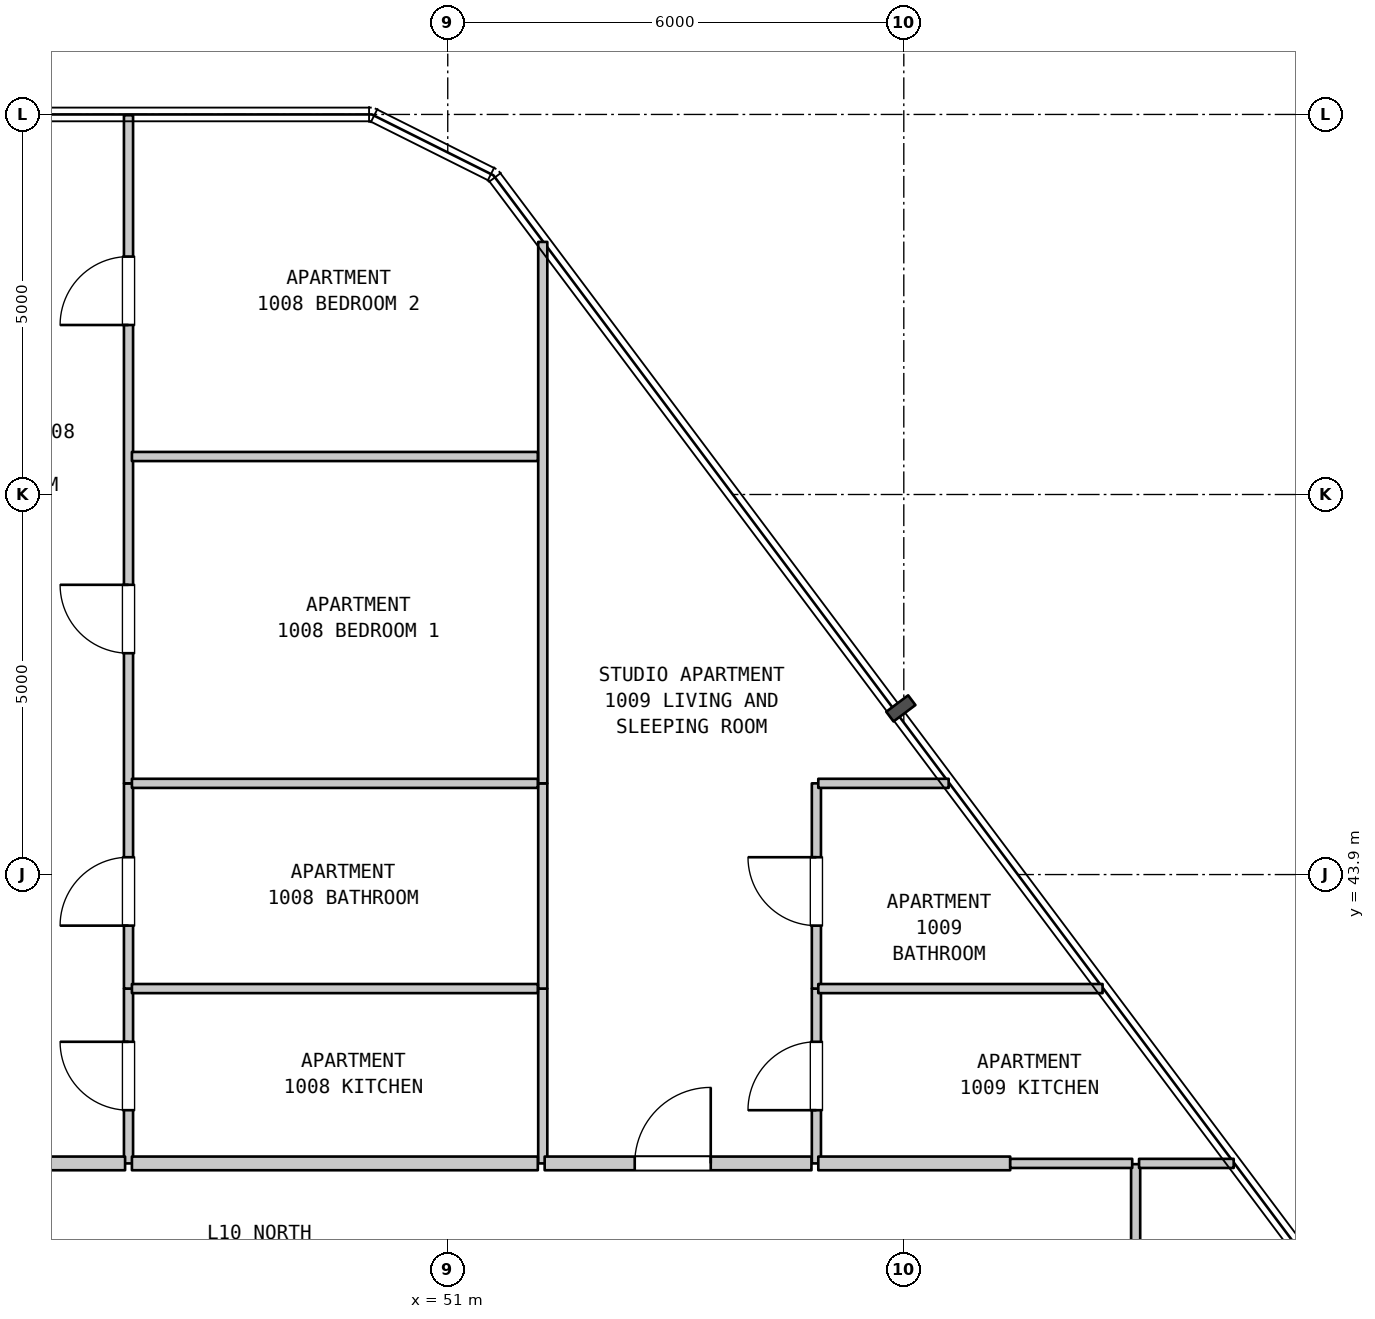
"""IFC4 building model, lengths in metres.
Left out: names, types, materials, properties, quantities, classifications, styles, units other than length and angle.
Written with IfcOpenShell. Run it as: python <this file> out.ifc"""

import sys

from ifc_helpers import new_model, si_unit, direction, frame, frame_2d, origin, place, context, subcontext, project, spatial, rectangle, extrude, element, fill, save


model = new_model("IFC4")
c1 = context("Model", 3, precision=1e-05, world=origin(), true_north=direction((0.0, 1.0)))
c2 = subcontext(c1, "Body", "Model", "MODEL_VIEW")
j1 = project(units=[si_unit("LENGTHUNIT", "METRE"), si_unit("PLANEANGLEUNIT", "RADIAN")], contexts=[c1])
p1 = place(None, origin())
s1 = spatial("IfcSite", under=j1, at=p1, CompositionType="ELEMENT")
p2 = place(p1, origin())
s2 = spatial("IfcBuilding", under=s1, at=p2, CompositionType="ELEMENT")
p3 = place(p2, frame((0.0, 0.0, 46.2)))
s3 = spatial("IfcBuildingStorey", under=s2, at=p3, CompositionType="ELEMENT", Elevation=46.2)
p4 = place(p3, frame((46.8, 40.1, 0.0), z_axis=(0.0, 0.0, 1.0), x_axis=(0.0, 1.0, 0.0)))
e1 = element("IfcWall", 1, at=p4, inside=s3, PredefinedType="PARTITIONING", context=c2, shape_type="SweptSolid", body=[
    extrude(rectangle(XDim=2.3, YDim=0.12, at=frame_2d((1.15, 0.0))), origin(), (0.0, 0.0, 1.0), 3.385),
])
p5 = place(p4, frame((0.7, 0.0, 0.0)))
e2 = element("IfcOpeningElement", 2, at=p5, cuts=e1, PredefinedType="OPENING", context=c2, shape_type="SweptSolid", body=[
    extrude(rectangle(XDim=0.9, YDim=2.15, at=frame_2d((0.45, 1.075))), frame((0.0, 0.07, 0.0), z_axis=(0.0, -1.0, 0.0), x_axis=(1.0, 0.0, 0.0)), (0.0, 0.0, 1.0), 0.14),
])
p6 = place(p3, frame((46.8, 42.4, 0.0), z_axis=(0.0, 0.0, 1.0), x_axis=(0.0, 1.0, 0.0)))
e3 = element("IfcWall", 3, at=p6, inside=s3, PredefinedType="PARTITIONING", context=c2, shape_type="SweptSolid", body=[
    extrude(rectangle(XDim=2.7, YDim=0.12, at=frame_2d((1.35, 0.0))), origin(), (0.0, 0.0, 1.0), 3.385),
])
p7 = place(p6, frame((0.828, 0.0, 0.0)))
e4 = element("IfcOpeningElement", 4, at=p7, cuts=e3, PredefinedType="OPENING", context=c2, shape_type="SweptSolid", body=[
    extrude(rectangle(XDim=0.9, YDim=2.1, at=frame_2d((0.45, 1.05))), frame((0.0, 0.07, 0.0), z_axis=(0.0, -1.0, 0.0), x_axis=(1.0, 0.0, 0.0)), (0.0, 0.0, 1.0), 0.14),
])
p8 = place(p3, frame((46.8, 45.1, 0.0), z_axis=(0.0, 0.0, 1.0), x_axis=(0.0, 1.0, 0.0)))
e5 = element("IfcWall", 5, at=p8, inside=s3, PredefinedType="PARTITIONING", context=c2, shape_type="SweptSolid", body=[
    extrude(rectangle(XDim=8.79, YDim=0.12, at=frame_2d((4.395, 0.0))), origin(), (0.0, 0.0, 1.0), 3.385),
])
p9 = place(p8, frame((1.712, 0.0, 0.0)))
e6 = element("IfcOpeningElement", 6, at=p9, cuts=e5, PredefinedType="OPENING", context=c2, shape_type="SweptSolid", body=[
    extrude(rectangle(XDim=0.9, YDim=2.15, at=frame_2d((0.45, 1.075))), frame((0.0, 0.07, 0.0), z_axis=(0.0, -1.0, 0.0), x_axis=(1.0, 0.0, 0.0)), (0.0, 0.0, 1.0), 0.14),
])
p10 = place(p8, frame((6.03, 0.0, 0.0)))
e7 = element("IfcOpeningElement", 7, at=p10, cuts=e5, PredefinedType="OPENING", context=c2, shape_type="SweptSolid", body=[
    extrude(rectangle(XDim=0.9, YDim=2.15, at=frame_2d((0.45, 1.075))), frame((0.0, 0.07, 0.0), z_axis=(0.0, -1.0, 0.0), x_axis=(1.0, 0.0, 0.0)), (0.0, 0.0, 1.0), 0.14),
])
p11 = place(p3, frame((52.25, 40.1, 0.0), z_axis=(0.0, 0.0, 1.0), x_axis=(0.0, 1.0, 0.0)))
e8 = element("IfcWall", 8, at=p11, inside=s3, PredefinedType="PARTITIONING", context=c2, shape_type="SweptSolid", body=[
    extrude(rectangle(XDim=2.3, YDim=0.12, at=frame_2d((1.15, 0.0))), origin(), (0.0, 0.0, 1.0), 3.385),
])
p12 = place(p3, frame((52.25, 42.4, 0.0), z_axis=(0.0, 0.0, 1.0), x_axis=(0.0, 1.0, 0.0)))
e9 = element("IfcWall", 9, at=p12, inside=s3, PredefinedType="PARTITIONING", context=c2, shape_type="SweptSolid", body=[
    extrude(rectangle(XDim=2.7, YDim=0.12, at=frame_2d((1.35, 0.0))), origin(), (0.0, 0.0, 1.0), 3.385),
])
p13 = place(p3, frame((52.25, 45.1, 0.0), z_axis=(0.0, 0.0, 1.0), x_axis=(0.0, 1.0, 0.0)))
e10 = element("IfcWall", 10, at=p13, inside=s3, PredefinedType="PARTITIONING", context=c2, shape_type="SweptSolid", body=[
    extrude(rectangle(XDim=7.123, YDim=0.12, at=frame_2d((3.562, 0.0))), origin(), (0.0, 0.0, 1.0), 3.385),
])
p14 = place(p3, frame((55.85, 40.1, 0.0), z_axis=(0.0, 0.0, 1.0), x_axis=(0.0, 1.0, 0.0)))
e11 = element("IfcWall", 11, at=p14, inside=s3, PredefinedType="PARTITIONING", context=c2, shape_type="SweptSolid", body=[
    extrude(rectangle(XDim=2.3, YDim=0.12, at=frame_2d((1.15, 0.0))), origin(), (0.0, 0.0, 1.0), 3.385),
])
p15 = place(p14, frame((0.7, 0.0, 0.0)))
e12 = element("IfcOpeningElement", 12, at=p15, cuts=e11, PredefinedType="OPENING", context=c2, shape_type="SweptSolid", body=[
    extrude(rectangle(XDim=0.9, YDim=2.15, at=frame_2d((0.45, 1.075))), frame((0.0, 0.07, 0.0), z_axis=(0.0, -1.0, 0.0), x_axis=(1.0, 0.0, 0.0)), (0.0, 0.0, 1.0), 0.14),
])
p16 = place(p3, frame((55.85, 42.4, 0.0), z_axis=(0.0, 0.0, 1.0), x_axis=(0.0, 1.0, 0.0)))
e13 = element("IfcWall", 13, at=p16, inside=s3, PredefinedType="PARTITIONING", context=c2, shape_type="SweptSolid", body=[
    extrude(rectangle(XDim=2.7, YDim=0.12, at=frame_2d((1.35, 0.0))), origin(), (0.0, 0.0, 1.0), 3.385),
])
p17 = place(p16, frame((0.828, 0.0, 0.0)))
e14 = element("IfcOpeningElement", 14, at=p17, cuts=e13, PredefinedType="OPENING", context=c2, shape_type="SweptSolid", body=[
    extrude(rectangle(XDim=0.9, YDim=2.1, at=frame_2d((0.45, 1.05))), frame((0.0, 0.07, 0.0), z_axis=(0.0, -1.0, 0.0), x_axis=(1.0, 0.0, 0.0)), (0.0, 0.0, 1.0), 0.14),
])
p18 = place(p3, frame((60.05, 37.89, 0.0), z_axis=(0.0, 0.0, 1.0), x_axis=(0.0, 1.0, 0.0)))
e15 = element("IfcWall", 15, at=p18, inside=s3, PredefinedType="PARTITIONING", context=c2, shape_type="SweptSolid", body=[
    extrude(rectangle(XDim=2.2, YDim=0.12, at=frame_2d((1.1, 0.0))), origin(), (0.0, 0.0, 1.0), 3.385),
])
p19 = place(p3, frame((42.795, 40.1, 0.0), z_axis=(0.0, 0.0, 1.0), x_axis=(1.0, 0.0, 0.0)))
e16 = element("IfcWall", 16, at=p19, inside=s3, PredefinedType="STANDARD", context=c2, shape_type="SweptSolid", body=[
    extrude(rectangle(XDim=3.96, YDim=0.18, at=frame_2d((1.98, 0.0))), origin(), (0.0, 0.0, 1.0), 3.385),
])
p20 = place(p19, frame((1.609, 0.0, 0.0)))
e17 = element("IfcOpeningElement", 17, at=p20, cuts=e16, PredefinedType="OPENING", context=c2, shape_type="SweptSolid", body=[
    extrude(rectangle(XDim=1.0, YDim=2.15, at=frame_2d((0.5, 1.075))), frame((0.0, 0.1, 0.0), z_axis=(0.0, -1.0, 0.0), x_axis=(1.0, 0.0, 0.0)), (0.0, 0.0, 1.0), 0.2),
])
p21 = place(p3, frame((46.845, 40.1, 0.0), z_axis=(0.0, 0.0, 1.0), x_axis=(1.0, 0.0, 0.0)))
e18 = element("IfcWall", 18, at=p21, inside=s3, PredefinedType="STANDARD", context=c2, shape_type="SweptSolid", body=[
    extrude(rectangle(XDim=5.34, YDim=0.18, at=frame_2d((2.67, 0.0))), origin(), (0.0, 0.0, 1.0), 3.385),
])
p22 = place(p3, frame((52.275, 40.1, 0.0), z_axis=(0.0, 0.0, 1.0), x_axis=(1.0, 0.0, 0.0)))
e19 = element("IfcWall", 19, at=p22, inside=s3, PredefinedType="STANDARD", context=c2, shape_type="SweptSolid", body=[
    extrude(rectangle(XDim=3.51, YDim=0.18, at=frame_2d((1.755, 0.0))), origin(), (0.0, 0.0, 1.0), 3.385),
])
p23 = place(p22, frame((1.185, 0.0, 0.0)))
e20 = element("IfcOpeningElement", 20, at=p23, cuts=e19, PredefinedType="OPENING", context=c2, shape_type="SweptSolid", body=[
    extrude(rectangle(XDim=1.0, YDim=2.15, at=frame_2d((0.5, 1.075))), frame((0.0, 0.1, 0.0), z_axis=(0.0, -1.0, 0.0), x_axis=(1.0, 0.0, 0.0)), (0.0, 0.0, 1.0), 0.2),
])
p24 = place(p3, frame((55.875, 40.1, 0.0), z_axis=(0.0, 0.0, 1.0), x_axis=(1.0, 0.0, 0.0)))
e21 = element("IfcWall", 21, at=p24, inside=s3, PredefinedType="STANDARD", context=c2, shape_type="SweptSolid", body=[
    extrude(rectangle(XDim=2.525, YDim=0.18, at=frame_2d((1.262, 0.0))), origin(), (0.0, 0.0, 1.0), 3.385),
])
p25 = place(p3, frame((58.4, 40.1, 0.0), z_axis=(0.0, 0.0, 1.0), x_axis=(1.0, 0.0, 0.0)))
e22 = element("IfcWall", 22, at=p25, inside=s3, PredefinedType="PARTITIONING", context=c2, shape_type="SweptSolid", body=[
    extrude(rectangle(XDim=1.605, YDim=0.12, at=frame_2d((0.802, 0.0))), origin(), (0.0, 0.0, 1.0), 3.385),
])
p26 = place(p3, frame((60.095, 40.1, 0.0), z_axis=(0.0, 0.0, 1.0), x_axis=(1.0, 0.0, 0.0)))
e23 = element("IfcWall", 23, at=p26, inside=s3, PredefinedType="PARTITIONING", context=c2, shape_type="SweptSolid", body=[
    extrude(rectangle(XDim=1.245, YDim=0.12, at=frame_2d((0.623, 0.0))), origin(), (0.0, 0.0, 1.0), 3.385),
])
p27 = place(p3, frame((46.845, 42.4, 0.0), z_axis=(0.0, 0.0, 1.0), x_axis=(1.0, 0.0, 0.0)))
e24 = element("IfcWall", 24, at=p27, inside=s3, PredefinedType="PARTITIONING", context=c2, shape_type="SweptSolid", body=[
    extrude(rectangle(XDim=5.34, YDim=0.12, at=frame_2d((2.67, 0.0))), origin(), (0.0, 0.0, 1.0), 3.385),
])
p28 = place(p3, frame((55.875, 42.4, 0.0), z_axis=(0.0, 0.0, 1.0), x_axis=(1.0, 0.0, 0.0)))
e25 = element("IfcWall", 25, at=p28, inside=s3, PredefinedType="PARTITIONING", context=c2, shape_type="SweptSolid", body=[
    extrude(rectangle(XDim=3.74, YDim=0.12, at=frame_2d((1.87, 0.0))), origin(), (0.0, 0.0, 1.0), 3.385),
])
p29 = place(p3, frame((46.845, 45.1, 0.0), z_axis=(0.0, 0.0, 1.0), x_axis=(1.0, 0.0, 0.0)))
e26 = element("IfcWall", 26, at=p29, inside=s3, PredefinedType="PARTITIONING", context=c2, shape_type="SweptSolid", body=[
    extrude(rectangle(XDim=5.34, YDim=0.12, at=frame_2d((2.67, 0.0))), origin(), (0.0, 0.0, 1.0), 3.385),
])
p30 = place(p3, frame((55.875, 45.1, 0.0), z_axis=(0.0, 0.0, 1.0), x_axis=(1.0, 0.0, 0.0)))
e27 = element("IfcWall", 27, at=p30, inside=s3, PredefinedType="PARTITIONING", context=c2, shape_type="SweptSolid", body=[
    extrude(rectangle(XDim=1.715, YDim=0.12, at=frame_2d((0.857, 0.0))), origin(), (0.0, 0.0, 1.0), 3.385),
])
p31 = place(p3, frame((46.845, 49.4, 0.0), z_axis=(0.0, 0.0, 1.0), x_axis=(1.0, 0.0, 0.0)))
e28 = element("IfcWall", 28, at=p31, inside=s3, PredefinedType="PARTITIONING", context=c2, shape_type="SweptSolid", body=[
    extrude(rectangle(XDim=5.34, YDim=0.12, at=frame_2d((2.67, 0.0))), origin(), (0.0, 0.0, 1.0), 3.385),
])
p32 = place(p5, origin())
e29 = element("IfcDoor", 29, at=p32, inside=s3, OperationType="SINGLE_SWING_RIGHT", PredefinedType="DOOR", context=c2, shape_type="SweptSolid", body=[
    extrude(rectangle(XDim=0.9, YDim=2.15, at=frame_2d((0.45, 1.075))), frame((0.0, 0.025, 0.0), z_axis=(0.0, -1.0, 0.0), x_axis=(1.0, 0.0, 0.0)), (0.0, 0.0, 1.0), 0.05),
])
fill(e2, e29)
p33 = place(p7, origin())
e30 = element("IfcDoor", 30, at=p33, inside=s3, OperationType="SINGLE_SWING_LEFT", PredefinedType="DOOR", context=c2, shape_type="SweptSolid", body=[
    extrude(rectangle(XDim=0.9, YDim=2.1, at=frame_2d((0.45, 1.05))), frame((0.0, 0.025, 0.0), z_axis=(0.0, -1.0, 0.0), x_axis=(1.0, 0.0, 0.0)), (0.0, 0.0, 1.0), 0.05),
])
fill(e4, e30)
p34 = place(p9, origin())
e31 = element("IfcDoor", 31, at=p34, inside=s3, OperationType="SINGLE_SWING_RIGHT", PredefinedType="DOOR", context=c2, shape_type="SweptSolid", body=[
    extrude(rectangle(XDim=0.9, YDim=2.15, at=frame_2d((0.45, 1.075))), frame((0.0, 0.025, 0.0), z_axis=(0.0, -1.0, 0.0), x_axis=(1.0, 0.0, 0.0)), (0.0, 0.0, 1.0), 0.05),
])
fill(e6, e31)
p35 = place(p10, origin())
e32 = element("IfcDoor", 32, at=p35, inside=s3, OperationType="SINGLE_SWING_LEFT", PredefinedType="DOOR", context=c2, shape_type="SweptSolid", body=[
    extrude(rectangle(XDim=0.9, YDim=2.15, at=frame_2d((0.45, 1.075))), frame((0.0, 0.025, 0.0), z_axis=(0.0, -1.0, 0.0), x_axis=(1.0, 0.0, 0.0)), (0.0, 0.0, 1.0), 0.05),
])
fill(e7, e32)
p36 = place(p15, origin())
e33 = element("IfcDoor", 33, at=p36, inside=s3, OperationType="SINGLE_SWING_LEFT", PredefinedType="DOOR", context=c2, shape_type="SweptSolid", body=[
    extrude(rectangle(XDim=0.9, YDim=2.15, at=frame_2d((0.45, 1.075))), frame((0.0, 0.025, 0.0), z_axis=(0.0, -1.0, 0.0), x_axis=(1.0, 0.0, 0.0)), (0.0, 0.0, 1.0), 0.05),
])
fill(e12, e33)
p37 = place(p17, origin())
e34 = element("IfcDoor", 34, at=p37, inside=s3, OperationType="SINGLE_SWING_RIGHT", PredefinedType="DOOR", context=c2, shape_type="SweptSolid", body=[
    extrude(rectangle(XDim=0.9, YDim=2.1, at=frame_2d((0.45, 1.05))), frame((0.0, 0.025, 0.0), z_axis=(0.0, -1.0, 0.0), x_axis=(1.0, 0.0, 0.0)), (0.0, 0.0, 1.0), 0.05),
])
fill(e14, e34)
p38 = place(p23, origin())
e35 = element("IfcDoor", 35, at=p38, inside=s3, OperationType="SINGLE_SWING_RIGHT", PredefinedType="DOOR", context=c2, shape_type="SweptSolid", body=[
    extrude(rectangle(XDim=1.0, YDim=2.15, at=frame_2d((0.5, 1.075))), frame((0.0, 0.025, 0.0), z_axis=(0.0, -1.0, 0.0), x_axis=(1.0, 0.0, 0.0)), (0.0, 0.0, 1.0), 0.05),
])
fill(e20, e35)
save(model, sys.argv[1])
